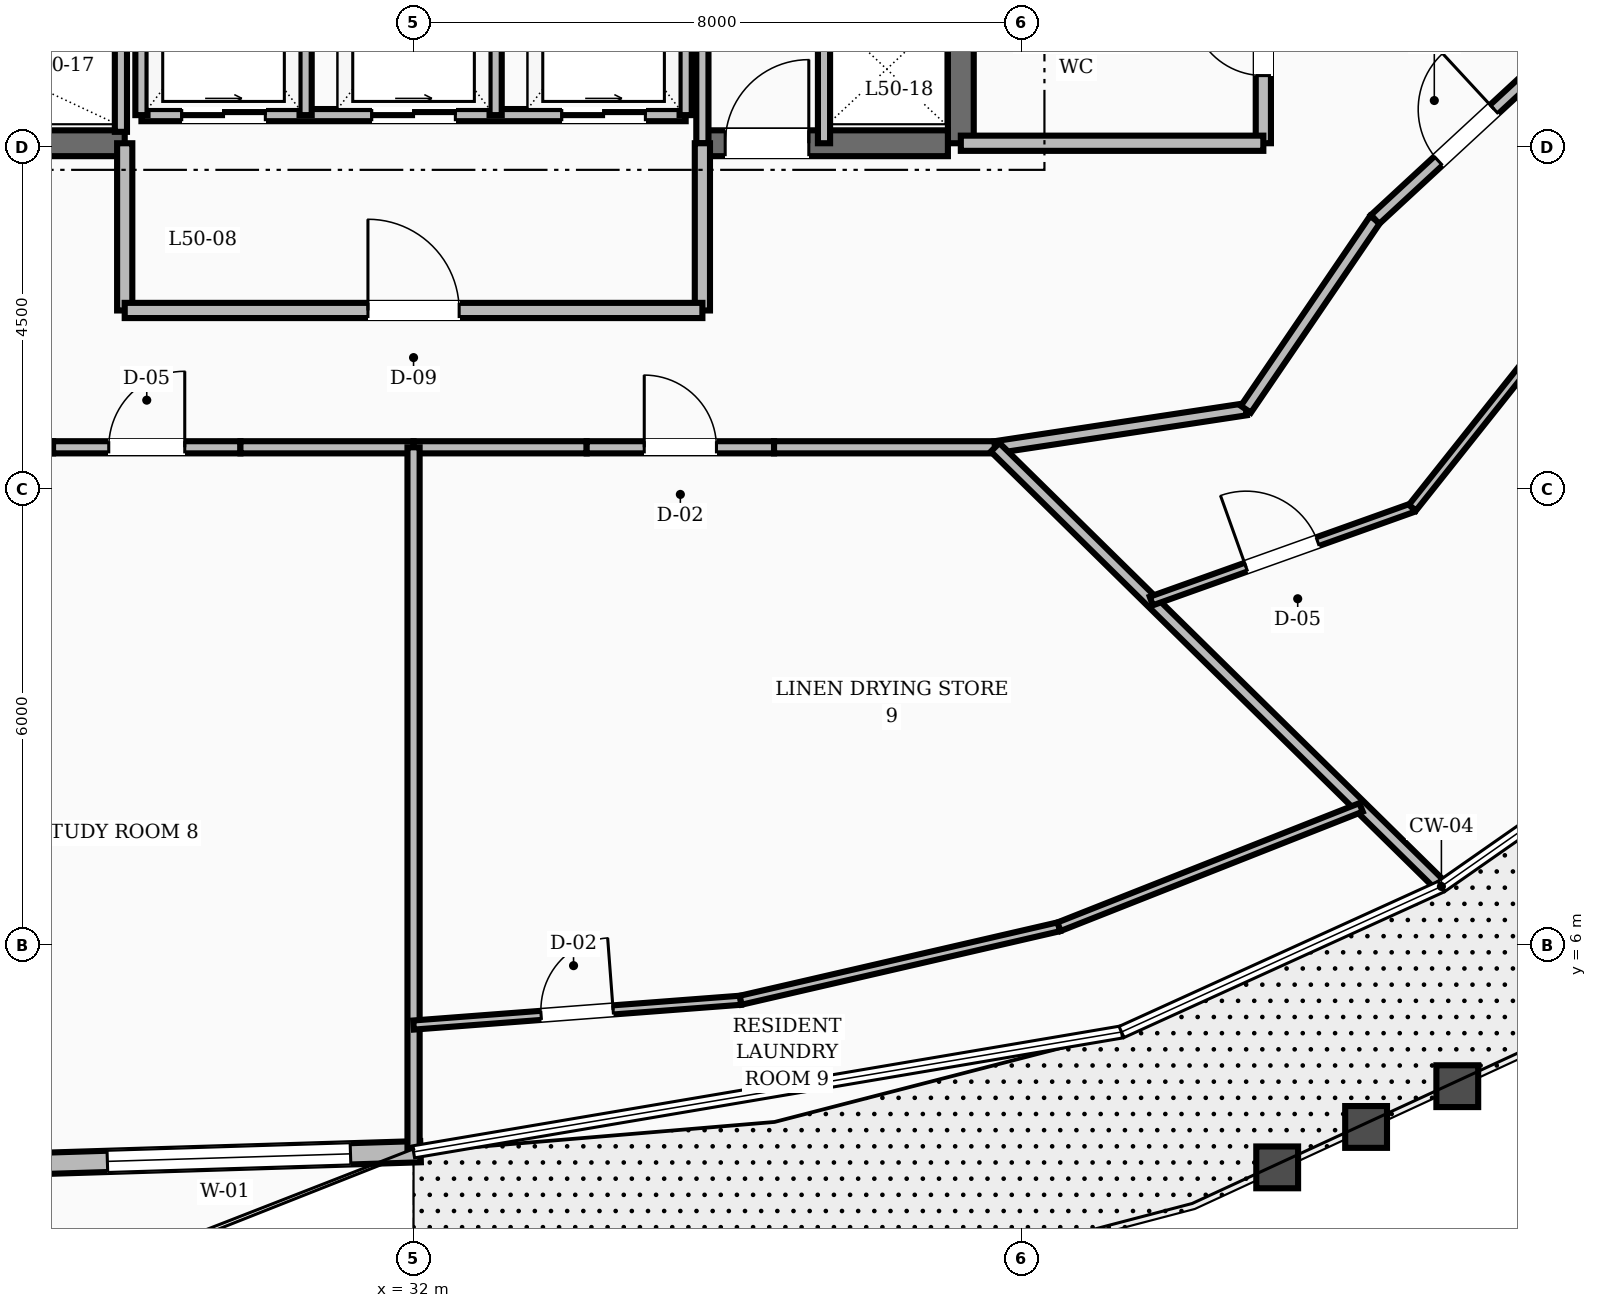
"""IFC4 building model, lengths in metres.
Left out: names, types, materials, properties, quantities, classifications, styles, units other than length and angle.
Written with IfcOpenShell. Run it as: python <this file> out.ifc"""

import sys

from ifc_helpers import new_model, si_unit, direction, frame, frame_2d, origin, place, context, subcontext, project, spatial, rectangle, extrude, element, fill, save


model = new_model("IFC4")
c1 = context("Model", 3, precision=1e-05, world=origin(), true_north=direction((0.0, 1.0)))
c2 = subcontext(c1, "Body", "Model", "MODEL_VIEW")
j1 = project(units=[si_unit("LENGTHUNIT", "METRE"), si_unit("PLANEANGLEUNIT", "RADIAN")], contexts=[c1])
p1 = place(None, origin())
s1 = spatial("IfcSite", under=j1, at=p1, CompositionType="ELEMENT")
p2 = place(p1, origin())
s2 = spatial("IfcBuilding", under=s1, at=p2, CompositionType="ELEMENT")
p3 = place(p2, frame((0.0, 0.0, 192.8)))
s3 = spatial("IfcBuildingStorey", under=s2, at=p3, CompositionType="ELEMENT", Elevation=192.8)
p4 = place(p3, frame((39.2, 16.55, 0.0), z_axis=(0.0, 0.0, 1.0), x_axis=(0.0, 1.0, 0.0)))
e1 = element("IfcWall", 1, at=p4, inside=s3, PredefinedType="SHEAR", context=c2, shape_type="SweptSolid", body=[
    extrude(rectangle(XDim=6.3, YDim=0.34, at=frame_2d((3.15, 0.0))), origin(), (0.0, 0.0, 1.0), 3.6),
])
p5 = place(p3, frame((24.97, 16.55, 0.0), z_axis=(0.0, 0.0, 1.0), x_axis=(1.0, 0.0, 0.0)))
e2 = element("IfcWall", 2, at=p5, inside=s3, PredefinedType="SHEAR", context=c2, shape_type="SweptSolid", body=[
    extrude(rectangle(XDim=3.23, YDim=0.34, at=frame_2d((1.615, 0.0))), origin(), (0.0, 0.0, 1.0), 3.6),
])
p6 = place(p3, frame((35.8, 16.55, 0.0), z_axis=(0.0, 0.0, 1.0), x_axis=(1.0, 0.0, 0.0)))
e3 = element("IfcWall", 3, at=p6, inside=s3, PredefinedType="SHEAR", context=c2, shape_type="SweptSolid", body=[
    extrude(rectangle(XDim=3.23, YDim=0.34, at=frame_2d((1.615, 0.0))), origin(), (0.0, 0.0, 1.0), 3.6),
])
p7 = place(p6, frame((0.3, 0.0, 0.0)))
e4 = element("IfcOpeningElement", 4, at=p7, cuts=e3, PredefinedType="OPENING", context=c2, shape_type="SweptSolid", body=[
    extrude(rectangle(XDim=1.1, YDim=2.1, at=frame_2d((0.55, 1.05))), frame((0.0, 0.18, 0.0), z_axis=(0.0, -1.0, 0.0), x_axis=(1.0, 0.0, 0.0)), (0.0, 0.0, 1.0), 0.36),
])
p8 = place(p3, frame((27.142, 3.129, 0.0), z_axis=(0.0, 0.0, 1.0), x_axis=(0.99951601215, 0.031108543142, 0.0)))
e5 = element("IfcWall", 5, at=p8, inside=s3, PredefinedType="STANDARD", context=c2, shape_type="SweptSolid", body=[
    extrude(rectangle(XDim=4.952, YDim=0.28, at=frame_2d((2.476, 0.0))), origin(), (0.0, 0.0, 1.0), 2.82),
])
p9 = place(p8, frame((0.83, 0.0, 0.8)))
e6 = element("IfcOpeningElement", 6, at=p9, cuts=e5, PredefinedType="OPENING", context=c2, shape_type="SweptSolid", body=[
    extrude(rectangle(XDim=3.2, YDim=1.65, at=frame_2d((1.6, 0.825))), frame((0.0, 0.15, 0.0), z_axis=(0.0, -1.0, 0.0), x_axis=(1.0, 0.0, 0.0)), (0.0, 0.0, 1.0), 0.3),
])
p10 = place(p3, frame((43.18, 16.55, 0.0), z_axis=(0.0, 0.0, 1.0), x_axis=(0.0, 1.0, 0.0)))
e7 = element("IfcWall", 7, at=p10, inside=s3, PredefinedType="SOLIDWALL", context=c2, shape_type="SweptSolid", body=[
    extrude(rectangle(XDim=2.73, YDim=0.2, at=frame_2d((1.365, 0.0))), origin(), (0.0, 0.0, 1.0), 2.8),
])
p11 = place(p10, frame((0.89, 0.0, 0.0)))
e8 = element("IfcOpeningElement", 8, at=p11, cuts=e7, PredefinedType="OPENING", context=c2, shape_type="SweptSolid", body=[
    extrude(rectangle(XDim=0.95, YDim=2.1, at=frame_2d((0.475, 1.05))), frame((0.0, 0.11, 0.0), z_axis=(0.0, -1.0, 0.0), x_axis=(1.0, 0.0, 0.0)), (0.0, 0.0, 1.0), 0.22),
])
p12 = place(p3, frame((39.2, 16.55, 0.0), z_axis=(0.0, 0.0, 1.0), x_axis=(1.0, 0.0, 0.0)))
e9 = element("IfcWall", 9, at=p12, inside=s3, PredefinedType="SOLIDWALL", context=c2, shape_type="SweptSolid", body=[
    extrude(rectangle(XDim=3.98, YDim=0.2, at=frame_2d((1.99, 0.0))), origin(), (0.0, 0.0, 1.0), 2.8),
])
p13 = place(p3, frame((35.8, 16.55, 0.0), z_axis=(0.0, 0.0, 1.0), x_axis=(0.0, 1.0, 0.0)))
e10 = element("IfcWall", 10, at=p13, inside=s3, PredefinedType="SOLIDWALL", context=c2, shape_type="SweptSolid", body=[
    extrude(rectangle(XDim=3.3, YDim=0.16, at=frame_2d((1.65, 0.0))), origin(), (0.0, 0.0, 1.0), 2.8),
])
p14 = place(p3, frame((37.4, 16.55, 0.0), z_axis=(0.0, 0.0, 1.0), x_axis=(0.0, 1.0, 0.0)))
e11 = element("IfcWall", 11, at=p14, inside=s3, PredefinedType="SOLIDWALL", context=c2, shape_type="SweptSolid", body=[
    extrude(rectangle(XDim=1.75, YDim=0.16, at=frame_2d((0.875, 0.0))), origin(), (0.0, 0.0, 1.0), 2.8),
])
for number, where, z_axis, x_axis in (
    (12, (28.2, 14.35, 0.0), (0.0, 0.0, 1.0), (0.0, 1.0, 0.0)),
    (13, (35.8, 14.35, 0.0), (0.0, 0.0, 1.0), (0.0, 1.0, 0.0)),
):
    element("IfcWall", number, at=place(p3, frame(where, z_axis=z_axis, x_axis=x_axis)), inside=s3, PredefinedType="SOLIDWALL", context=c2, shape_type="SweptSolid", body=[
        extrude(rectangle(XDim=2.2, YDim=0.2, at=frame_2d((1.1, 0.0))), origin(), (0.0, 0.0, 1.0), 2.8),
    ])
p15 = place(p3, frame((28.2, 14.35, 0.0), z_axis=(0.0, 0.0, 1.0), x_axis=(1.0, 0.0, 0.0)))
e14 = element("IfcWall", 14, at=p15, inside=s3, PredefinedType="SOLIDWALL", context=c2, shape_type="SweptSolid", body=[
    extrude(rectangle(XDim=7.6, YDim=0.2, at=frame_2d((3.8, 0.0))), origin(), (0.0, 0.0, 1.0), 2.8),
])
p16 = place(p15, frame((3.2, 0.0, 0.0)))
e15 = element("IfcOpeningElement", 15, at=p16, cuts=e14, PredefinedType="OPENING", context=c2, shape_type="SweptSolid", body=[
    extrude(rectangle(XDim=1.2, YDim=2.1, at=frame_2d((0.6, 1.05))), frame((0.0, 0.11, 0.0), z_axis=(0.0, -1.0, 0.0), x_axis=(1.0, 0.0, 0.0)), (0.0, 0.0, 1.0), 0.22),
])
p17 = place(p3, frame((28.42, 16.92, 0.0), z_axis=(0.0, 0.0, 1.0), x_axis=(1.0, 0.0, 0.0)))
e16 = element("IfcWall", 16, at=p17, inside=s3, PredefinedType="SOLIDWALL", context=c2, shape_type="SweptSolid", body=[
    extrude(rectangle(XDim=7.16, YDim=0.16, at=frame_2d((3.58, 0.0))), origin(), (0.0, 0.0, 1.0), 2.8),
])
p18 = place(p17, frame((0.53, 0.0, 0.0)))
e17 = element("IfcOpeningElement", 17, at=p18, cuts=e16, PredefinedType="OPENING", context=c2, shape_type="SweptSolid", body=[
    extrude(rectangle(XDim=1.1, YDim=2.15, at=frame_2d((0.55, 1.075))), frame((0.0, 0.09, 0.0), z_axis=(0.0, -1.0, 0.0), x_axis=(1.0, 0.0, 0.0)), (0.0, 0.0, 1.0), 0.18),
])
p19 = place(p17, frame((3.03, 0.0, 0.0)))
e18 = element("IfcOpeningElement", 18, at=p19, cuts=e16, PredefinedType="OPENING", context=c2, shape_type="SweptSolid", body=[
    extrude(rectangle(XDim=1.1, YDim=2.15, at=frame_2d((0.55, 1.075))), frame((0.0, 0.09, 0.0), z_axis=(0.0, -1.0, 0.0), x_axis=(1.0, 0.0, 0.0)), (0.0, 0.0, 1.0), 0.18),
])
p20 = place(p17, frame((5.53, 0.0, 0.0)))
e19 = element("IfcOpeningElement", 19, at=p20, cuts=e16, PredefinedType="OPENING", context=c2, shape_type="SweptSolid", body=[
    extrude(rectangle(XDim=1.1, YDim=2.15, at=frame_2d((0.55, 1.075))), frame((0.0, 0.09, 0.0), z_axis=(0.0, -1.0, 0.0), x_axis=(1.0, 0.0, 0.0)), (0.0, 0.0, 1.0), 0.18),
])
for number, where, z_axis, x_axis in (
    (20, (28.42, 16.92, 0.0), (0.0, 0.0, 1.0), (0.0, 1.0, 0.0)),
    (21, (30.58, 16.92, 0.0), (0.0, 0.0, 1.0), (0.0, 1.0, 0.0)),
    (22, (33.08, 16.92, 0.0), (0.0, 0.0, 1.0), (0.0, 1.0, 0.0)),
    (23, (35.58, 16.92, 0.0), (0.0, 0.0, 1.0), (0.0, 1.0, 0.0)),
):
    element("IfcWall", number, at=place(p3, frame(where, z_axis=z_axis, x_axis=x_axis)), inside=s3, PredefinedType="SOLIDWALL", context=c2, shape_type="SweptSolid", body=[
        extrude(rectangle(XDim=2.76, YDim=0.16, at=frame_2d((1.38, 0.0))), origin(), (0.0, 0.0, 1.0), 2.8),
    ])
p21 = place(p3, frame((28.15, 16.7, 0.0), z_axis=(0.0, 0.0, 1.0), x_axis=(0.0, 1.0, 0.0)))
e24 = element("IfcWall", 24, at=p21, inside=s3, PredefinedType="SOLIDWALL", context=c2, shape_type="SweptSolid", body=[
    extrude(rectangle(XDim=6.05, YDim=0.16, at=frame_2d((3.025, 0.0))), origin(), (0.0, 0.0, 1.0), 2.8),
])
p22 = place(p3, frame((24.349, 12.55, 0.0), z_axis=(0.0, 0.0, 1.0), x_axis=(1.0, 0.0, 0.0)))
e25 = element("IfcWall", 25, at=p22, inside=s3, PredefinedType="SOLIDWALL", context=c2, shape_type="SweptSolid", body=[
    extrude(rectangle(XDim=2.908, YDim=0.16, at=frame_2d((1.454, 0.0))), origin(), (0.0, 0.0, 1.0), 2.8),
])
p23 = place(p3, frame((27.257, 12.55, 0.0), z_axis=(0.0, 0.0, 1.0), x_axis=(1.0, 0.0, 0.0)))
e26 = element("IfcWall", 26, at=p23, inside=s3, PredefinedType="SOLIDWALL", context=c2, shape_type="SweptSolid", body=[
    extrude(rectangle(XDim=2.465, YDim=0.16, at=frame_2d((1.232, 0.0))), origin(), (0.0, 0.0, 1.0), 2.8),
])
p24 = place(p23, frame((0.733, 0.0, 0.0)))
e27 = element("IfcOpeningElement", 27, at=p24, cuts=e26, PredefinedType="OPENING", context=c2, shape_type="SweptSolid", body=[
    extrude(rectangle(XDim=1.0, YDim=2.1, at=frame_2d((0.5, 1.05))), frame((0.0, 0.09, 0.0), z_axis=(0.0, -1.0, 0.0), x_axis=(1.0, 0.0, 0.0)), (0.0, 0.0, 1.0), 0.18),
])
for number, where, z_axis, x_axis in (
    (28, (29.722, 12.55, 0.0), (0.0, 0.0, 1.0), (1.0, 0.0, 0.0)),
    (29, (32.0, 12.55, 0.0), (0.0, 0.0, 1.0), (1.0, 0.0, 0.0)),
):
    element("IfcWall", number, at=place(p3, frame(where, z_axis=z_axis, x_axis=x_axis)), inside=s3, PredefinedType="SOLIDWALL", context=c2, shape_type="SweptSolid", body=[
        extrude(rectangle(XDim=2.278, YDim=0.16, at=frame_2d((1.139, 0.0))), origin(), (0.0, 0.0, 1.0), 2.8),
    ])
p25 = place(p3, frame((34.278, 12.55, 0.0), z_axis=(0.0, 0.0, 1.0), x_axis=(1.0, 0.0, 0.0)))
e30 = element("IfcWall", 30, at=p25, inside=s3, PredefinedType="SOLIDWALL", context=c2, shape_type="SweptSolid", body=[
    extrude(rectangle(XDim=2.465, YDim=0.16, at=frame_2d((1.232, 0.0))), origin(), (0.0, 0.0, 1.0), 2.8),
])
p26 = place(p25, frame((0.758, 0.0, 0.0)))
e31 = element("IfcOpeningElement", 31, at=p26, cuts=e30, PredefinedType="OPENING", context=c2, shape_type="SweptSolid", body=[
    extrude(rectangle(XDim=0.95, YDim=2.1, at=frame_2d((0.475, 1.05))), frame((0.0, 0.09, 0.0), z_axis=(0.0, -1.0, 0.0), x_axis=(1.0, 0.0, 0.0)), (0.0, 0.0, 1.0), 0.18),
])
p27 = place(p3, frame((36.743, 12.55, 0.0), z_axis=(0.0, 0.0, 1.0), x_axis=(1.0, 0.0, 0.0)))
e32 = element("IfcWall", 32, at=p27, inside=s3, PredefinedType="SOLIDWALL", context=c2, shape_type="SweptSolid", body=[
    extrude(rectangle(XDim=2.908, YDim=0.16, at=frame_2d((1.454, 0.0))), origin(), (0.0, 0.0, 1.0), 2.8),
])
p28 = place(p3, frame((39.651, 12.55, 0.0), z_axis=(0.0, 0.0, 1.0), x_axis=(0.988710906508, 0.149835721217, 0.0)))
e33 = element("IfcWall", 33, at=p28, inside=s3, PredefinedType="SOLIDWALL", context=c2, shape_type="SweptSolid", body=[
    extrude(rectangle(XDim=3.337, YDim=0.16, at=frame_2d((1.668, 0.0))), origin(), (0.0, 0.0, 1.0), 2.8),
])
p29 = place(p3, frame((42.95, 13.05, 0.0), z_axis=(0.0, 0.0, 1.0), x_axis=(0.562674669208, 0.826678423955, 0.0)))
e34 = element("IfcWall", 34, at=p29, inside=s3, PredefinedType="SOLIDWALL", context=c2, shape_type="SweptSolid", body=[
    extrude(rectangle(XDim=3.021, YDim=0.16, at=frame_2d((1.511, 0.0))), origin(), (0.0, 0.0, 1.0), 2.8),
])
p30 = place(p3, frame((44.65, 15.548, 0.0), z_axis=(0.0, 0.0, 1.0), x_axis=(0.734347936521, 0.678773237633, 0.0)))
e35 = element("IfcWall", 35, at=p30, inside=s3, PredefinedType="SOLIDWALL", context=c2, shape_type="SweptSolid", body=[
    extrude(rectangle(XDim=3.268, YDim=0.16, at=frame_2d((1.634, 0.0))), origin(), (0.0, 0.0, 1.0), 2.8),
])
p31 = place(p30, frame((1.134, 0.0, 0.0)))
e36 = element("IfcOpeningElement", 36, at=p31, cuts=e35, PredefinedType="OPENING", context=c2, shape_type="SweptSolid", body=[
    extrude(rectangle(XDim=1.0, YDim=2.1, at=frame_2d((0.5, 1.05))), frame((0.0, 0.09, 0.0), z_axis=(0.0, -1.0, 0.0), x_axis=(1.0, 0.0, 0.0)), (0.0, 0.0, 1.0), 0.18),
])
p32 = place(p3, frame((39.651, 12.55, 0.0), z_axis=(0.0, 0.0, 1.0), x_axis=(0.71282340305, -0.701343564927, 0.0)))
e37 = element("IfcWall", 37, at=p32, inside=s3, PredefinedType="SOLIDWALL", context=c2, shape_type="SweptSolid", body=[
    extrude(rectangle(XDim=8.188, YDim=0.16, at=frame_2d((4.094, 0.0))), origin(), (0.0, 0.0, 1.0), 2.8),
])
p33 = place(p3, frame((41.706, 10.528, 0.0), z_axis=(0.0, 0.0, 1.0), x_axis=(0.941757051858, 0.33629400125, 0.0)))
e38 = element("IfcWall", 38, at=p33, inside=s3, PredefinedType="PARTITIONING", context=c2, shape_type="SweptSolid", body=[
    extrude(rectangle(XDim=3.648, YDim=0.12, at=frame_2d((1.824, 0.0))), origin(), (0.0, 0.0, 1.0), 2.8),
])
p34 = place(p33, frame((1.324, 0.0, 0.0)))
e39 = element("IfcOpeningElement", 39, at=p34, cuts=e38, PredefinedType="OPENING", context=c2, shape_type="SweptSolid", body=[
    extrude(rectangle(XDim=1.0, YDim=2.1, at=frame_2d((0.5, 1.05))), frame((0.0, 0.07, 0.0), z_axis=(0.0, -1.0, 0.0), x_axis=(1.0, 0.0, 0.0)), (0.0, 0.0, 1.0), 0.14),
])
p35 = place(p3, frame((45.141, 11.755, 0.0), z_axis=(0.0, 0.0, 1.0), x_axis=(0.622346697339, 0.782741712387, 0.0)))
e40 = element("IfcWall", 40, at=p35, inside=s3, PredefinedType="PARTITIONING", context=c2, shape_type="SweptSolid", body=[
    extrude(rectangle(XDim=3.478, YDim=0.12, at=frame_2d((1.739, 0.0))), origin(), (0.0, 0.0, 1.0), 2.8),
])
p36 = place(p3, frame((32.0, 12.55, 0.0), z_axis=(0.0, 0.0, 1.0), x_axis=(0.0, -1.0, 0.0)))
e41 = element("IfcWall", 41, at=p36, inside=s3, PredefinedType="SOLIDWALL", context=c2, shape_type="SweptSolid", body=[
    extrude(rectangle(XDim=9.219, YDim=0.16, at=frame_2d((4.61, 0.0))), origin(), (0.0, 0.0, 1.0), 2.8),
])
p37 = place(p3, frame((32.0, 4.949, 0.0), z_axis=(0.0, 0.0, 1.0), x_axis=(0.997140363468, 0.075571790651, 0.0)))
e42 = element("IfcWall", 42, at=p37, inside=s3, PredefinedType="PARTITIONING", context=c2, shape_type="SweptSolid", body=[
    extrude(rectangle(XDim=4.316, YDim=0.12, at=frame_2d((2.158, 0.0))), origin(), (0.0, 0.0, 1.0), 2.8),
])
p38 = place(p37, frame((1.683, 0.0, 0.0)))
e43 = element("IfcOpeningElement", 43, at=p38, cuts=e42, PredefinedType="OPENING", context=c2, shape_type="SweptSolid", body=[
    extrude(rectangle(XDim=0.95, YDim=2.1, at=frame_2d((0.475, 1.05))), frame((0.0, 0.07, 0.0), z_axis=(0.0, -1.0, 0.0), x_axis=(1.0, 0.0, 0.0)), (0.0, 0.0, 1.0), 0.14),
])
p39 = place(p3, frame((36.304, 5.275, 0.0), z_axis=(0.0, 0.0, 1.0), x_axis=(0.974361510368, 0.224988104382, 0.0)))
e44 = element("IfcWall", 44, at=p39, inside=s3, PredefinedType="PARTITIONING", context=c2, shape_type="SweptSolid", body=[
    extrude(rectangle(XDim=4.298, YDim=0.12, at=frame_2d((2.149, 0.0))), origin(), (0.0, 0.0, 1.0), 2.8),
])
p40 = place(p3, frame((40.492, 6.242, 0.0), z_axis=(0.0, 0.0, 1.0), x_axis=(0.930040659777, 0.367456624871, 0.0)))
e45 = element("IfcWall", 45, at=p40, inside=s3, PredefinedType="PARTITIONING", context=c2, shape_type="SweptSolid", body=[
    extrude(rectangle(XDim=4.273, YDim=0.12, at=frame_2d((2.136, 0.0))), origin(), (0.0, 0.0, 1.0), 2.8),
])
p41 = place(p9, origin())
e46 = element("IfcWindow", 46, at=p41, inside=s3, PartitioningType="SINGLE_PANEL", PredefinedType="WINDOW", context=c2, shape_type="SweptSolid", body=[
    extrude(rectangle(XDim=3.2, YDim=1.65, at=frame_2d((1.6, 0.825))), frame((0.0, 0.03, 0.0), z_axis=(0.0, -1.0, 0.0), x_axis=(1.0, 0.0, 0.0)), (0.0, 0.0, 1.0), 0.06),
])
fill(e6, e46)
p42 = place(p11, origin())
e47 = element("IfcDoor", 47, at=p42, inside=s3, OperationType="SINGLE_SWING_RIGHT", PredefinedType="DOOR", context=c2, shape_type="SweptSolid", body=[
    extrude(rectangle(XDim=0.95, YDim=2.1, at=frame_2d((0.475, 1.05))), frame((0.0, 0.025, 0.0), z_axis=(0.0, -1.0, 0.0), x_axis=(1.0, 0.0, 0.0)), (0.0, 0.0, 1.0), 0.05),
])
fill(e8, e47)
p43 = place(p7, origin())
e48 = element("IfcDoor", 48, at=p43, inside=s3, OperationType="SINGLE_SWING_RIGHT", PredefinedType="DOOR", context=c2, shape_type="SweptSolid", body=[
    extrude(rectangle(XDim=1.1, YDim=2.1, at=frame_2d((0.55, 1.05))), frame((0.0, 0.025, 0.0), z_axis=(0.0, -1.0, 0.0), x_axis=(1.0, 0.0, 0.0)), (0.0, 0.0, 1.0), 0.05),
])
fill(e4, e48)
p44 = place(p16, origin())
e49 = element("IfcDoor", 49, at=p44, inside=s3, OperationType="SINGLE_SWING_LEFT", PredefinedType="DOOR", context=c2, shape_type="SweptSolid", body=[
    extrude(rectangle(XDim=1.2, YDim=2.1, at=frame_2d((0.6, 1.05))), frame((0.0, 0.025, 0.0), z_axis=(0.0, -1.0, 0.0), x_axis=(1.0, 0.0, 0.0)), (0.0, 0.0, 1.0), 0.05),
])
fill(e15, e49)
p45 = place(p18, origin())
e50 = element("IfcDoor", 50, at=p45, inside=s3, OperationType="SLIDING_TO_RIGHT", PredefinedType="DOOR", context=c2, shape_type="SweptSolid", body=[
    extrude(rectangle(XDim=1.1, YDim=2.15, at=frame_2d((0.55, 1.075))), frame((0.0, 0.025, 0.0), z_axis=(0.0, -1.0, 0.0), x_axis=(1.0, 0.0, 0.0)), (0.0, 0.0, 1.0), 0.05),
])
fill(e17, e50)
p46 = place(p19, origin())
e51 = element("IfcDoor", 51, at=p46, inside=s3, OperationType="SLIDING_TO_RIGHT", PredefinedType="DOOR", context=c2, shape_type="SweptSolid", body=[
    extrude(rectangle(XDim=1.1, YDim=2.15, at=frame_2d((0.55, 1.075))), frame((0.0, 0.025, 0.0), z_axis=(0.0, -1.0, 0.0), x_axis=(1.0, 0.0, 0.0)), (0.0, 0.0, 1.0), 0.05),
])
fill(e18, e51)
p47 = place(p20, origin())
e52 = element("IfcDoor", 52, at=p47, inside=s3, OperationType="SLIDING_TO_RIGHT", PredefinedType="DOOR", context=c2, shape_type="SweptSolid", body=[
    extrude(rectangle(XDim=1.1, YDim=2.15, at=frame_2d((0.55, 1.075))), frame((0.0, 0.025, 0.0), z_axis=(0.0, -1.0, 0.0), x_axis=(1.0, 0.0, 0.0)), (0.0, 0.0, 1.0), 0.05),
])
fill(e19, e52)
p48 = place(p31, origin())
e53 = element("IfcDoor", 53, at=p48, inside=s3, OperationType="SINGLE_SWING_RIGHT", PredefinedType="DOOR", context=c2, shape_type="SweptSolid", body=[
    extrude(rectangle(XDim=1.0, YDim=2.1, at=frame_2d((0.5, 1.05))), frame((0.0, 0.025, 0.0), z_axis=(0.0, -1.0, 0.0), x_axis=(1.0, 0.0, 0.0)), (0.0, 0.0, 1.0), 0.05),
])
fill(e36, e53)
p49 = place(p34, origin())
e54 = element("IfcDoor", 54, at=p49, inside=s3, OperationType="SINGLE_SWING_LEFT", PredefinedType="DOOR", context=c2, shape_type="SweptSolid", body=[
    extrude(rectangle(XDim=1.0, YDim=2.1, at=frame_2d((0.5, 1.05))), frame((0.0, 0.025, 0.0), z_axis=(0.0, -1.0, 0.0), x_axis=(1.0, 0.0, 0.0)), (0.0, 0.0, 1.0), 0.05),
])
fill(e39, e54)
p50 = place(p24, origin())
e55 = element("IfcDoor", 55, at=p50, inside=s3, OperationType="SINGLE_SWING_RIGHT", PredefinedType="DOOR", context=c2, shape_type="SweptSolid", body=[
    extrude(rectangle(XDim=1.0, YDim=2.1, at=frame_2d((0.5, 1.05))), frame((0.0, 0.025, 0.0), z_axis=(0.0, -1.0, 0.0), x_axis=(1.0, 0.0, 0.0)), (0.0, 0.0, 1.0), 0.05),
])
fill(e27, e55)
p51 = place(p26, origin())
e56 = element("IfcDoor", 56, at=p51, inside=s3, OperationType="SINGLE_SWING_LEFT", PredefinedType="DOOR", context=c2, shape_type="SweptSolid", body=[
    extrude(rectangle(XDim=0.95, YDim=2.1, at=frame_2d((0.475, 1.05))), frame((0.0, 0.025, 0.0), z_axis=(0.0, -1.0, 0.0), x_axis=(1.0, 0.0, 0.0)), (0.0, 0.0, 1.0), 0.05),
])
fill(e31, e56)
p52 = place(p38, origin())
e57 = element("IfcDoor", 57, at=p52, inside=s3, OperationType="SINGLE_SWING_RIGHT", PredefinedType="DOOR", context=c2, shape_type="SweptSolid", body=[
    extrude(rectangle(XDim=0.95, YDim=2.1, at=frame_2d((0.475, 1.05))), frame((0.0, 0.025, 0.0), z_axis=(0.0, -1.0, 0.0), x_axis=(1.0, 0.0, 0.0)), (0.0, 0.0, 1.0), 0.05),
])
fill(e43, e57)
save(model, sys.argv[1])
